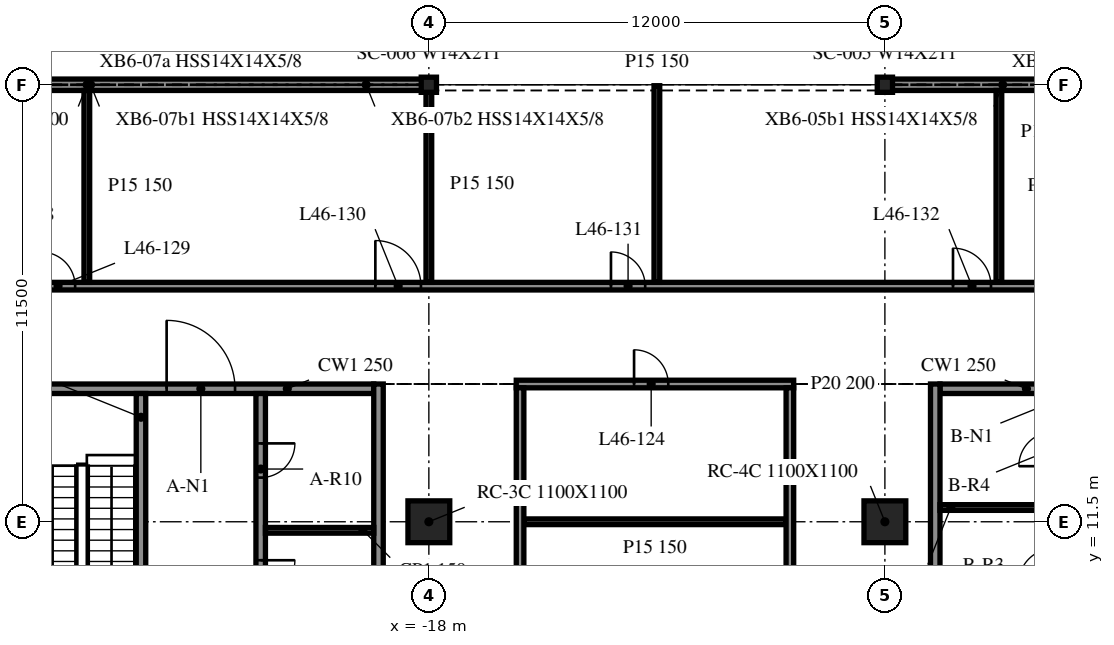
"""IFC4 building model, lengths in metres.
Left out: names, types, materials, properties, quantities, classifications, styles, units other than length and angle.
Written with IfcOpenShell. Run it as: python <this file> out.ifc"""

import sys

from ifc_helpers import new_model, si_unit, direction, frame, frame_2d, origin, origin_2d, place, context, subcontext, project, spatial, rectangle, i_section, extrude, element, fill, save


model = new_model("IFC4")
c1 = context("Model", 3, precision=1e-05, world=origin(), true_north=direction((0.0, 1.0)))
c2 = subcontext(c1, "Body", "Model", "MODEL_VIEW")
j1 = project(units=[si_unit("LENGTHUNIT", "METRE"), si_unit("PLANEANGLEUNIT", "RADIAN")], contexts=[c1])
p1 = place(None, origin())
s1 = spatial("IfcSite", under=j1, at=p1, CompositionType="ELEMENT")
p2 = place(p1, origin())
s2 = spatial("IfcBuilding", under=s1, at=p2, CompositionType="ELEMENT")
p3 = place(p2, frame((0.0, 0.0, 193.9)))
s3 = spatial("IfcBuildingStorey", under=s2, at=p3, CompositionType="ELEMENT", Elevation=193.9)
for number, where, z_axis, x_axis in (
    (1, (-18.0, 11.5, -0.34), (0.0, 0.0, 1.0), (1.0, 0.0, 0.0)),
    (2, (-6.0, 11.5, -0.34), (0.0, 0.0, 1.0), (1.0, 0.0, 0.0)),
):
    element("IfcColumn", number, at=place(p3, frame(where, z_axis=z_axis, x_axis=x_axis)), inside=s3, PredefinedType="COLUMN", context=c2, shape_type="SweptSolid", body=[
        extrude(rectangle(XDim=1.1, YDim=1.1, at=origin_2d()), origin(), (0.0, 0.0, 1.0), 3.8),
    ])
for number, where, z_axis, x_axis in (
    (3, (-6.0, 23.0, -0.34), (0.0, 0.0, 1.0), (1.0, 0.0, 0.0)),
    (4, (-18.0, 23.0, -0.34), (0.0, 0.0, 1.0), (1.0, 0.0, 0.0)),
):
    element("IfcColumn", number, at=place(p3, frame(where, z_axis=z_axis, x_axis=x_axis)), inside=s3, PredefinedType="COLUMN", context=c2, shape_type="SweptSolid", body=[
        extrude(i_section(OverallWidth=0.401, OverallDepth=0.399, WebThickness=0.025, FlangeThickness=0.04, at=origin_2d()), origin(), (0.0, 0.0, 1.0), 3.8),
    ])
for number, where, z_axis, x_axis in (
    (5, (5.988, 23.0, 0.0), (0.0, 0.0, 1.0), (-1.0, 0.0, 0.0)),
    (6, (-18.012, 23.0, 0.0), (0.0, 0.0, 1.0), (-1.0, 0.0, 0.0)),
):
    element("IfcWall", number, at=place(p3, frame(where, z_axis=z_axis, x_axis=x_axis)), inside=s3, PredefinedType="NOTDEFINED", context=c2, shape_type="SweptSolid", body=[
        extrude(rectangle(XDim=11.975, YDim=0.3, at=frame_2d((5.988, 0.0))), origin(), (0.0, 0.0, 1.0), 2.782),
    ])
p4 = place(p3, frame((-19.325, -9.125, 0.0), z_axis=(0.0, 0.0, 1.0), x_axis=(0.0, 1.0, 0.0)))
e7 = element("IfcWall", 7, at=p4, inside=s3, PredefinedType="SOLIDWALL", context=c2, shape_type="SweptSolid", body=[
    extrude(rectangle(XDim=24.25, YDim=0.25, at=frame_2d((12.125, 0.0))), origin(), (0.0, 0.0, 1.0), 3.46),
])
p5 = place(p3, frame((-28.55, 15.0, 0.0), z_axis=(0.0, 0.0, 1.0), x_axis=(1.0, 0.0, 0.0)))
e8 = element("IfcWall", 8, at=p5, inside=s3, PredefinedType="SOLIDWALL", context=c2, shape_type="SweptSolid", body=[
    extrude(rectangle(XDim=9.1, YDim=0.25, at=frame_2d((4.55, 0.0))), origin(), (0.0, 0.0, 1.0), 3.46),
])
p6 = place(p5, frame((3.65, 0.0, 0.0)))
e9 = element("IfcOpeningElement", 9, at=p6, cuts=e8, PredefinedType="OPENING", context=c2, shape_type="SweptSolid", body=[
    extrude(rectangle(XDim=1.8, YDim=2.1, at=frame_2d((0.9, 1.05))), frame((0.0, 0.135, 0.0), z_axis=(0.0, -1.0, 0.0), x_axis=(1.0, 0.0, 0.0)), (0.0, 0.0, 1.0), 0.27),
])
p7 = place(p3, frame((-25.575, 14.875, 0.0), z_axis=(0.0, 0.0, 1.0), x_axis=(0.0, -1.0, 0.0)))
e10 = element("IfcWall", 10, at=p7, inside=s3, PredefinedType="SOLIDWALL", context=c2, shape_type="SweptSolid", body=[
    extrude(rectangle(XDim=6.25, YDim=0.25, at=frame_2d((3.125, 0.0))), origin(), (0.0, 0.0, 1.0), 3.46),
])
p8 = place(p7, frame((4.85, 0.0, 0.0)))
e11 = element("IfcOpeningElement", 11, at=p8, cuts=e10, PredefinedType="OPENING", context=c2, shape_type="SweptSolid", body=[
    extrude(rectangle(XDim=1.0, YDim=2.1, at=frame_2d((0.5, 1.05))), frame((0.0, 0.135, 0.0), z_axis=(0.0, -1.0, 0.0), x_axis=(1.0, 0.0, 0.0)), (0.0, 0.0, 1.0), 0.27),
])
p9 = place(p3, frame((-22.425, 14.875, 0.0), z_axis=(0.0, 0.0, 1.0), x_axis=(0.0, -1.0, 0.0)))
e12 = element("IfcWall", 12, at=p9, inside=s3, PredefinedType="SOLIDWALL", context=c2, shape_type="SweptSolid", body=[
    extrude(rectangle(XDim=23.75, YDim=0.25, at=frame_2d((11.875, 0.0))), origin(), (0.0, 0.0, 1.0), 3.46),
])
p10 = place(p9, frame((11.425, 0.0, 0.0)))
e13 = element("IfcOpeningElement", 13, at=p10, cuts=e12, PredefinedType="OPENING", context=c2, shape_type="SweptSolid", body=[
    extrude(rectangle(XDim=0.9, YDim=2.1, at=frame_2d((0.45, 1.05))), frame((0.0, 0.135, 0.0), z_axis=(0.0, -1.0, 0.0), x_axis=(1.0, 0.0, 0.0)), (0.0, 0.0, 1.0), 0.27),
])
p11 = place(p9, frame((21.337, 0.0, 0.0)))
e14 = element("IfcOpeningElement", 14, at=p11, cuts=e12, PredefinedType="OPENING", context=c2, shape_type="SweptSolid", body=[
    extrude(rectangle(XDim=0.9, YDim=2.1, at=frame_2d((0.45, 1.05))), frame((0.0, 0.135, 0.0), z_axis=(0.0, -1.0, 0.0), x_axis=(1.0, 0.0, 0.0)), (0.0, 0.0, 1.0), 0.27),
])
p12 = place(p9, frame((18.262, 0.0, 0.0)))
e15 = element("IfcOpeningElement", 15, at=p12, cuts=e12, PredefinedType="OPENING", context=c2, shape_type="SweptSolid", body=[
    extrude(rectangle(XDim=0.9, YDim=2.1, at=frame_2d((0.45, 1.05))), frame((0.0, 0.135, 0.0), z_axis=(0.0, -1.0, 0.0), x_axis=(1.0, 0.0, 0.0)), (0.0, 0.0, 1.0), 0.27),
])
p13 = place(p9, frame((4.387, 0.0, 0.0)))
e16 = element("IfcOpeningElement", 16, at=p13, cuts=e12, PredefinedType="OPENING", context=c2, shape_type="SweptSolid", body=[
    extrude(rectangle(XDim=0.9, YDim=2.1, at=frame_2d((0.45, 1.05))), frame((0.0, 0.135, 0.0), z_axis=(0.0, -1.0, 0.0), x_axis=(1.0, 0.0, 0.0)), (0.0, 0.0, 1.0), 0.27),
])
p14 = place(p9, frame((1.312, 0.0, 0.0)))
e17 = element("IfcOpeningElement", 17, at=p14, cuts=e12, PredefinedType="OPENING", context=c2, shape_type="SweptSolid", body=[
    extrude(rectangle(XDim=0.9, YDim=2.1, at=frame_2d((0.45, 1.05))), frame((0.0, 0.135, 0.0), z_axis=(0.0, -1.0, 0.0), x_axis=(1.0, 0.0, 0.0)), (0.0, 0.0, 1.0), 0.27),
])
p15 = place(p3, frame((-22.3, 11.275, 0.0), z_axis=(0.0, 0.0, 1.0), x_axis=(1.0, 0.0, 0.0)))
e18 = element("IfcWall", 18, at=p15, inside=s3, PredefinedType="PARTITIONING", context=c2, shape_type="SweptSolid", body=[
    extrude(rectangle(XDim=2.85, YDim=0.15, at=frame_2d((1.425, 0.0))), origin(), (0.0, 0.0, 1.0), 3.46),
])
p16 = place(p3, frame((-4.675, 15.125, 0.0), z_axis=(0.0, 0.0, 1.0), x_axis=(0.0, -1.0, 0.0)))
e19 = element("IfcWall", 19, at=p16, inside=s3, PredefinedType="SOLIDWALL", context=c2, shape_type="SweptSolid", body=[
    extrude(rectangle(XDim=24.25, YDim=0.25, at=frame_2d((12.125, 0.0))), origin(), (0.0, 0.0, 1.0), 3.46),
])
p17 = place(p3, frame((-4.55, 15.0, 0.0), z_axis=(0.0, 0.0, 1.0), x_axis=(1.0, 0.0, 0.0)))
e20 = element("IfcWall", 20, at=p17, inside=s3, PredefinedType="SOLIDWALL", context=c2, shape_type="SweptSolid", body=[
    extrude(rectangle(XDim=9.1, YDim=0.25, at=frame_2d((4.55, 0.0))), origin(), (0.0, 0.0, 1.0), 3.46),
])
p18 = place(p17, frame((3.65, 0.0, 0.0)))
e21 = element("IfcOpeningElement", 21, at=p18, cuts=e20, PredefinedType="OPENING", context=c2, shape_type="SweptSolid", body=[
    extrude(rectangle(XDim=1.8, YDim=2.1, at=frame_2d((0.9, 1.05))), frame((0.0, 0.135, 0.0), z_axis=(0.0, -1.0, 0.0), x_axis=(1.0, 0.0, 0.0)), (0.0, 0.0, 1.0), 0.27),
])
p19 = place(p3, frame((-4.55, 11.875, 0.0), z_axis=(0.0, 0.0, 1.0), x_axis=(1.0, 0.0, 0.0)))
e22 = element("IfcWall", 22, at=p19, inside=s3, PredefinedType="PARTITIONING", context=c2, shape_type="SweptSolid", body=[
    extrude(rectangle(XDim=2.85, YDim=0.15, at=frame_2d((1.425, 0.0))), origin(), (0.0, 0.0, 1.0), 3.46),
])
p20 = place(p3, frame((-15.5, 11.5, 0.0), z_axis=(0.0, 0.0, 1.0), x_axis=(1.0, 0.0, 0.0)))
e23 = element("IfcWall", 23, at=p20, inside=s3, PredefinedType="PARTITIONING", context=c2, shape_type="SweptSolid", body=[
    extrude(rectangle(XDim=6.9, YDim=0.15, at=frame_2d((3.45, 0.0))), origin(), (0.0, 0.0, 1.0), 3.46),
])
p21 = place(p3, frame((-15.7, 15.125, 0.0), z_axis=(0.0, 0.0, 1.0), x_axis=(1.0, 0.0, 0.0)))
e24 = element("IfcWall", 24, at=p21, inside=s3, PredefinedType="PARTITIONING", context=c2, shape_type="SweptSolid", body=[
    extrude(rectangle(XDim=7.3, YDim=0.2, at=frame_2d((3.65, 0.0))), origin(), (0.0, 0.0, 1.0), 3.46),
])
p22 = place(p21, frame((3.1, 0.0, 0.0)))
e25 = element("IfcOpeningElement", 25, at=p22, cuts=e24, PredefinedType="OPENING", context=c2, shape_type="SweptSolid", body=[
    extrude(rectangle(XDim=0.9, YDim=2.1, at=frame_2d((0.45, 1.05))), frame((0.0, 0.11, 0.0), z_axis=(0.0, -1.0, 0.0), x_axis=(1.0, 0.0, 0.0)), (0.0, 0.0, 1.0), 0.22),
])
p23 = place(p3, frame((-41.708, 17.7, 0.0), z_axis=(0.0, 0.0, 1.0), x_axis=(1.0, 0.0, 0.0)))
e26 = element("IfcWall", 26, at=p23, inside=s3, PredefinedType="PARTITIONING", context=c2, shape_type="SweptSolid", body=[
    extrude(rectangle(XDim=95.416, YDim=0.2, at=frame_2d((47.708, 0.0))), origin(), (0.0, 0.0, 1.0), 3.46),
])
p24 = place(p23, frame((7.5, 0.0, 0.0)))
e27 = element("IfcOpeningElement", 27, at=p24, cuts=e26, PredefinedType="OPENING", context=c2, shape_type="SweptSolid", body=[
    extrude(rectangle(XDim=1.0, YDim=2.1, at=frame_2d((0.5, 1.05))), frame((0.0, 0.11, 0.0), z_axis=(0.0, -1.0, 0.0), x_axis=(1.0, 0.0, 0.0)), (0.0, 0.0, 1.0), 0.22),
])
p25 = place(p23, frame((10.5, 0.0, 0.0)))
e28 = element("IfcOpeningElement", 28, at=p25, cuts=e26, PredefinedType="OPENING", context=c2, shape_type="SweptSolid", body=[
    extrude(rectangle(XDim=1.0, YDim=2.1, at=frame_2d((0.5, 1.05))), frame((0.0, 0.11, 0.0), z_axis=(0.0, -1.0, 0.0), x_axis=(1.0, 0.0, 0.0)), (0.0, 0.0, 1.0), 0.22),
])
p26 = place(p23, frame((13.5, 0.0, 0.0)))
e29 = element("IfcOpeningElement", 29, at=p26, cuts=e26, PredefinedType="OPENING", context=c2, shape_type="SweptSolid", body=[
    extrude(rectangle(XDim=0.9, YDim=2.1, at=frame_2d((0.45, 1.05))), frame((0.0, 0.11, 0.0), z_axis=(0.0, -1.0, 0.0), x_axis=(1.0, 0.0, 0.0)), (0.0, 0.0, 1.0), 0.22),
])
p27 = place(p23, frame((22.3, 0.0, 0.0)))
e30 = element("IfcOpeningElement", 30, at=p27, cuts=e26, PredefinedType="OPENING", context=c2, shape_type="SweptSolid", body=[
    extrude(rectangle(XDim=1.2, YDim=2.1, at=frame_2d((0.6, 1.05))), frame((0.0, 0.11, 0.0), z_axis=(0.0, -1.0, 0.0), x_axis=(1.0, 0.0, 0.0)), (0.0, 0.0, 1.0), 0.22),
])
p28 = place(p23, frame((28.5, 0.0, 0.0)))
e31 = element("IfcOpeningElement", 31, at=p28, cuts=e26, PredefinedType="OPENING", context=c2, shape_type="SweptSolid", body=[
    extrude(rectangle(XDim=0.9, YDim=2.1, at=frame_2d((0.45, 1.05))), frame((0.0, 0.11, 0.0), z_axis=(0.0, -1.0, 0.0), x_axis=(1.0, 0.0, 0.0)), (0.0, 0.0, 1.0), 0.22),
])
p29 = place(p23, frame((37.5, 0.0, 0.0)))
e32 = element("IfcOpeningElement", 32, at=p29, cuts=e26, PredefinedType="OPENING", context=c2, shape_type="SweptSolid", body=[
    extrude(rectangle(XDim=1.0, YDim=2.1, at=frame_2d((0.5, 1.05))), frame((0.0, 0.11, 0.0), z_axis=(0.0, -1.0, 0.0), x_axis=(1.0, 0.0, 0.0)), (0.0, 0.0, 1.0), 0.22),
])
p30 = place(p23, frame((40.5, 0.0, 0.0)))
e33 = element("IfcOpeningElement", 33, at=p30, cuts=e26, PredefinedType="OPENING", context=c2, shape_type="SweptSolid", body=[
    extrude(rectangle(XDim=1.0, YDim=2.1, at=frame_2d((0.5, 1.05))), frame((0.0, 0.11, 0.0), z_axis=(0.0, -1.0, 0.0), x_axis=(1.0, 0.0, 0.0)), (0.0, 0.0, 1.0), 0.22),
])
p31 = place(p23, frame((43.5, 0.0, 0.0)))
e34 = element("IfcOpeningElement", 34, at=p31, cuts=e26, PredefinedType="OPENING", context=c2, shape_type="SweptSolid", body=[
    extrude(rectangle(XDim=0.9, YDim=2.1, at=frame_2d((0.45, 1.05))), frame((0.0, 0.11, 0.0), z_axis=(0.0, -1.0, 0.0), x_axis=(1.0, 0.0, 0.0)), (0.0, 0.0, 1.0), 0.22),
])
p32 = place(p23, frame((47.1, 0.0, 0.0)))
e35 = element("IfcOpeningElement", 35, at=p32, cuts=e26, PredefinedType="OPENING", context=c2, shape_type="SweptSolid", body=[
    extrude(rectangle(XDim=1.2, YDim=2.1, at=frame_2d((0.6, 1.05))), frame((0.0, 0.11, 0.0), z_axis=(0.0, -1.0, 0.0), x_axis=(1.0, 0.0, 0.0)), (0.0, 0.0, 1.0), 0.22),
])
p33 = place(p23, frame((54.1, 0.0, 0.0)))
e36 = element("IfcOpeningElement", 36, at=p33, cuts=e26, PredefinedType="OPENING", context=c2, shape_type="SweptSolid", body=[
    extrude(rectangle(XDim=0.9, YDim=2.1, at=frame_2d((0.45, 1.05))), frame((0.0, 0.11, 0.0), z_axis=(0.0, -1.0, 0.0), x_axis=(1.0, 0.0, 0.0)), (0.0, 0.0, 1.0), 0.22),
])
p34 = place(p23, frame((60.1, 0.0, 0.0)))
e37 = element("IfcOpeningElement", 37, at=p34, cuts=e26, PredefinedType="OPENING", context=c2, shape_type="SweptSolid", body=[
    extrude(rectangle(XDim=1.0, YDim=2.1, at=frame_2d((0.5, 1.05))), frame((0.0, 0.11, 0.0), z_axis=(0.0, -1.0, 0.0), x_axis=(1.0, 0.0, 0.0)), (0.0, 0.0, 1.0), 0.22),
])
p35 = place(p23, frame((69.1, 0.0, 0.0)))
e38 = element("IfcOpeningElement", 38, at=p35, cuts=e26, PredefinedType="OPENING", context=c2, shape_type="SweptSolid", body=[
    extrude(rectangle(XDim=1.0, YDim=2.1, at=frame_2d((0.5, 1.05))), frame((0.0, 0.11, 0.0), z_axis=(0.0, -1.0, 0.0), x_axis=(1.0, 0.0, 0.0)), (0.0, 0.0, 1.0), 0.22),
])
p36 = place(p23, frame((72.1, 0.0, 0.0)))
e39 = element("IfcOpeningElement", 39, at=p36, cuts=e26, PredefinedType="OPENING", context=c2, shape_type="SweptSolid", body=[
    extrude(rectangle(XDim=0.9, YDim=2.1, at=frame_2d((0.45, 1.05))), frame((0.0, 0.11, 0.0), z_axis=(0.0, -1.0, 0.0), x_axis=(1.0, 0.0, 0.0)), (0.0, 0.0, 1.0), 0.22),
])
p37 = place(p23, frame((75.1, 0.0, 0.0)))
e40 = element("IfcOpeningElement", 40, at=p37, cuts=e26, PredefinedType="OPENING", context=c2, shape_type="SweptSolid", body=[
    extrude(rectangle(XDim=1.2, YDim=2.1, at=frame_2d((0.6, 1.05))), frame((0.0, 0.11, 0.0), z_axis=(0.0, -1.0, 0.0), x_axis=(1.0, 0.0, 0.0)), (0.0, 0.0, 1.0), 0.22),
])
p38 = place(p23, frame((84.1, 0.0, 0.0)))
e41 = element("IfcOpeningElement", 41, at=p38, cuts=e26, PredefinedType="OPENING", context=c2, shape_type="SweptSolid", body=[
    extrude(rectangle(XDim=0.9, YDim=2.1, at=frame_2d((0.45, 1.05))), frame((0.0, 0.11, 0.0), z_axis=(0.0, -1.0, 0.0), x_axis=(1.0, 0.0, 0.0)), (0.0, 0.0, 1.0), 0.22),
])
p39 = place(p23, frame((90.1, 0.0, 0.0)))
e42 = element("IfcOpeningElement", 42, at=p39, cuts=e26, PredefinedType="OPENING", context=c2, shape_type="SweptSolid", body=[
    extrude(rectangle(XDim=1.0, YDim=2.1, at=frame_2d((0.5, 1.05))), frame((0.0, 0.11, 0.0), z_axis=(0.0, -1.0, 0.0), x_axis=(1.0, 0.0, 0.0)), (0.0, 0.0, 1.0), 0.22),
])
p40 = place(p3, frame((-27.0, 17.8, 0.0), z_axis=(0.0, 0.0, 1.0), x_axis=(0.0, 1.0, 0.0)))
e43 = element("IfcWall", 43, at=p40, inside=s3, PredefinedType="PARTITIONING", context=c2, shape_type="SweptSolid", body=[
    extrude(rectangle(XDim=5.05, YDim=0.15, at=frame_2d((2.525, 0.0))), origin(), (0.0, 0.0, 1.0), 3.46),
])
p41 = place(p3, frame((-18.0, 17.8, 0.0), z_axis=(0.0, 0.0, 1.0), x_axis=(0.0, 1.0, 0.0)))
e44 = element("IfcWall", 44, at=p41, inside=s3, PredefinedType="PARTITIONING", context=c2, shape_type="SweptSolid", body=[
    extrude(rectangle(XDim=5.175, YDim=0.15, at=frame_2d((2.587, 0.0))), origin(), (0.0, 0.0, 1.0), 3.46),
])
p42 = place(p3, frame((-15.6, -9.025, 0.0), z_axis=(0.0, 0.0, 1.0), x_axis=(0.0, 1.0, 0.0)))
e45 = element("IfcWall", 45, at=p42, inside=s3, PredefinedType="PARTITIONING", context=c2, shape_type="SweptSolid", body=[
    extrude(rectangle(XDim=24.05, YDim=0.2, at=frame_2d((12.025, 0.0))), origin(), (0.0, 0.0, 1.0), 3.46),
])
p43 = place(p42, frame((11.5, 0.0, 0.0)))
e46 = element("IfcOpeningElement", 46, at=p43, cuts=e45, PredefinedType="OPENING", context=c2, shape_type="SweptSolid", body=[
    extrude(rectangle(XDim=0.9, YDim=2.1, at=frame_2d((0.45, 1.05))), frame((0.0, 0.11, 0.0), z_axis=(0.0, -1.0, 0.0), x_axis=(1.0, 0.0, 0.0)), (0.0, 0.0, 1.0), 0.22),
])
p44 = place(p3, frame((-12.0, 17.8, 0.0), z_axis=(0.0, 0.0, 1.0), x_axis=(0.0, 1.0, 0.0)))
e47 = element("IfcWall", 47, at=p44, inside=s3, PredefinedType="PARTITIONING", context=c2, shape_type="SweptSolid", body=[
    extrude(rectangle(XDim=5.175, YDim=0.15, at=frame_2d((2.587, 0.0))), origin(), (0.0, 0.0, 1.0), 3.46),
])
p45 = place(p3, frame((-8.5, -9.025, 0.0), z_axis=(0.0, 0.0, 1.0), x_axis=(0.0, 1.0, 0.0)))
e48 = element("IfcWall", 48, at=p45, inside=s3, PredefinedType="PARTITIONING", context=c2, shape_type="SweptSolid", body=[
    extrude(rectangle(XDim=24.05, YDim=0.2, at=frame_2d((12.025, 0.0))), origin(), (0.0, 0.0, 1.0), 3.46),
])
p46 = place(p3, frame((-3.0, 17.8, 0.0), z_axis=(0.0, 0.0, 1.0), x_axis=(0.0, 1.0, 0.0)))
e49 = element("IfcWall", 49, at=p46, inside=s3, PredefinedType="PARTITIONING", context=c2, shape_type="SweptSolid", body=[
    extrude(rectangle(XDim=5.05, YDim=0.15, at=frame_2d((2.525, 0.0))), origin(), (0.0, 0.0, 1.0), 3.46),
])
p47 = place(p6, origin())
e50 = element("IfcDoor", 50, at=p47, inside=s3, OperationType="DOUBLE_DOOR_SINGLE_SWING", PredefinedType="DOOR", context=c2, shape_type="SweptSolid", body=[
    extrude(rectangle(XDim=1.8, YDim=2.1, at=frame_2d((0.9, 1.05))), frame((0.0, 0.025, 0.0), z_axis=(0.0, -1.0, 0.0), x_axis=(1.0, 0.0, 0.0)), (0.0, 0.0, 1.0), 0.05),
])
fill(e9, e50)
p48 = place(p13, origin())
e51 = element("IfcDoor", 51, at=p48, inside=s3, OperationType="SINGLE_SWING_LEFT", PredefinedType="DOOR", context=c2, shape_type="SweptSolid", body=[
    extrude(rectangle(XDim=0.9, YDim=2.1, at=frame_2d((0.45, 1.05))), frame((0.0, 0.025, 0.0), z_axis=(0.0, -1.0, 0.0), x_axis=(1.0, 0.0, 0.0)), (0.0, 0.0, 1.0), 0.05),
])
fill(e16, e51)
p49 = place(p14, origin())
e52 = element("IfcDoor", 52, at=p49, inside=s3, OperationType="SINGLE_SWING_RIGHT", PredefinedType="DOOR", context=c2, shape_type="SweptSolid", body=[
    extrude(rectangle(XDim=0.9, YDim=2.1, at=frame_2d((0.45, 1.05))), frame((0.0, 0.025, 0.0), z_axis=(0.0, -1.0, 0.0), x_axis=(1.0, 0.0, 0.0)), (0.0, 0.0, 1.0), 0.05),
])
fill(e17, e52)
p50 = place(p22, origin())
e53 = element("IfcDoor", 53, at=p50, inside=s3, OperationType="SINGLE_SWING_RIGHT", PredefinedType="DOOR", context=c2, shape_type="SweptSolid", body=[
    extrude(rectangle(XDim=0.9, YDim=2.1, at=frame_2d((0.45, 1.05))), frame((0.0, 0.025, 0.0), z_axis=(0.0, -1.0, 0.0), x_axis=(1.0, 0.0, 0.0)), (0.0, 0.0, 1.0), 0.05),
])
fill(e25, e53)
p51 = place(p26, origin())
e54 = element("IfcDoor", 54, at=p51, inside=s3, OperationType="SINGLE_SWING_LEFT", PredefinedType="DOOR", context=c2, shape_type="SweptSolid", body=[
    extrude(rectangle(XDim=0.9, YDim=2.1, at=frame_2d((0.45, 1.05))), frame((0.0, 0.025, 0.0), z_axis=(0.0, -1.0, 0.0), x_axis=(1.0, 0.0, 0.0)), (0.0, 0.0, 1.0), 0.05),
])
fill(e29, e54)
p52 = place(p27, origin())
e55 = element("IfcDoor", 55, at=p52, inside=s3, OperationType="SINGLE_SWING_LEFT", PredefinedType="DOOR", context=c2, shape_type="SweptSolid", body=[
    extrude(rectangle(XDim=1.2, YDim=2.1, at=frame_2d((0.6, 1.05))), frame((0.0, 0.025, 0.0), z_axis=(0.0, -1.0, 0.0), x_axis=(1.0, 0.0, 0.0)), (0.0, 0.0, 1.0), 0.05),
])
fill(e30, e55)
p53 = place(p28, origin())
e56 = element("IfcDoor", 56, at=p53, inside=s3, OperationType="SINGLE_SWING_LEFT", PredefinedType="DOOR", context=c2, shape_type="SweptSolid", body=[
    extrude(rectangle(XDim=0.9, YDim=2.1, at=frame_2d((0.45, 1.05))), frame((0.0, 0.025, 0.0), z_axis=(0.0, -1.0, 0.0), x_axis=(1.0, 0.0, 0.0)), (0.0, 0.0, 1.0), 0.05),
])
fill(e31, e56)
p54 = place(p29, origin())
e57 = element("IfcDoor", 57, at=p54, inside=s3, OperationType="SINGLE_SWING_LEFT", PredefinedType="DOOR", context=c2, shape_type="SweptSolid", body=[
    extrude(rectangle(XDim=1.0, YDim=2.1, at=frame_2d((0.5, 1.05))), frame((0.0, 0.025, 0.0), z_axis=(0.0, -1.0, 0.0), x_axis=(1.0, 0.0, 0.0)), (0.0, 0.0, 1.0), 0.05),
])
fill(e32, e57)
save(model, sys.argv[1])
